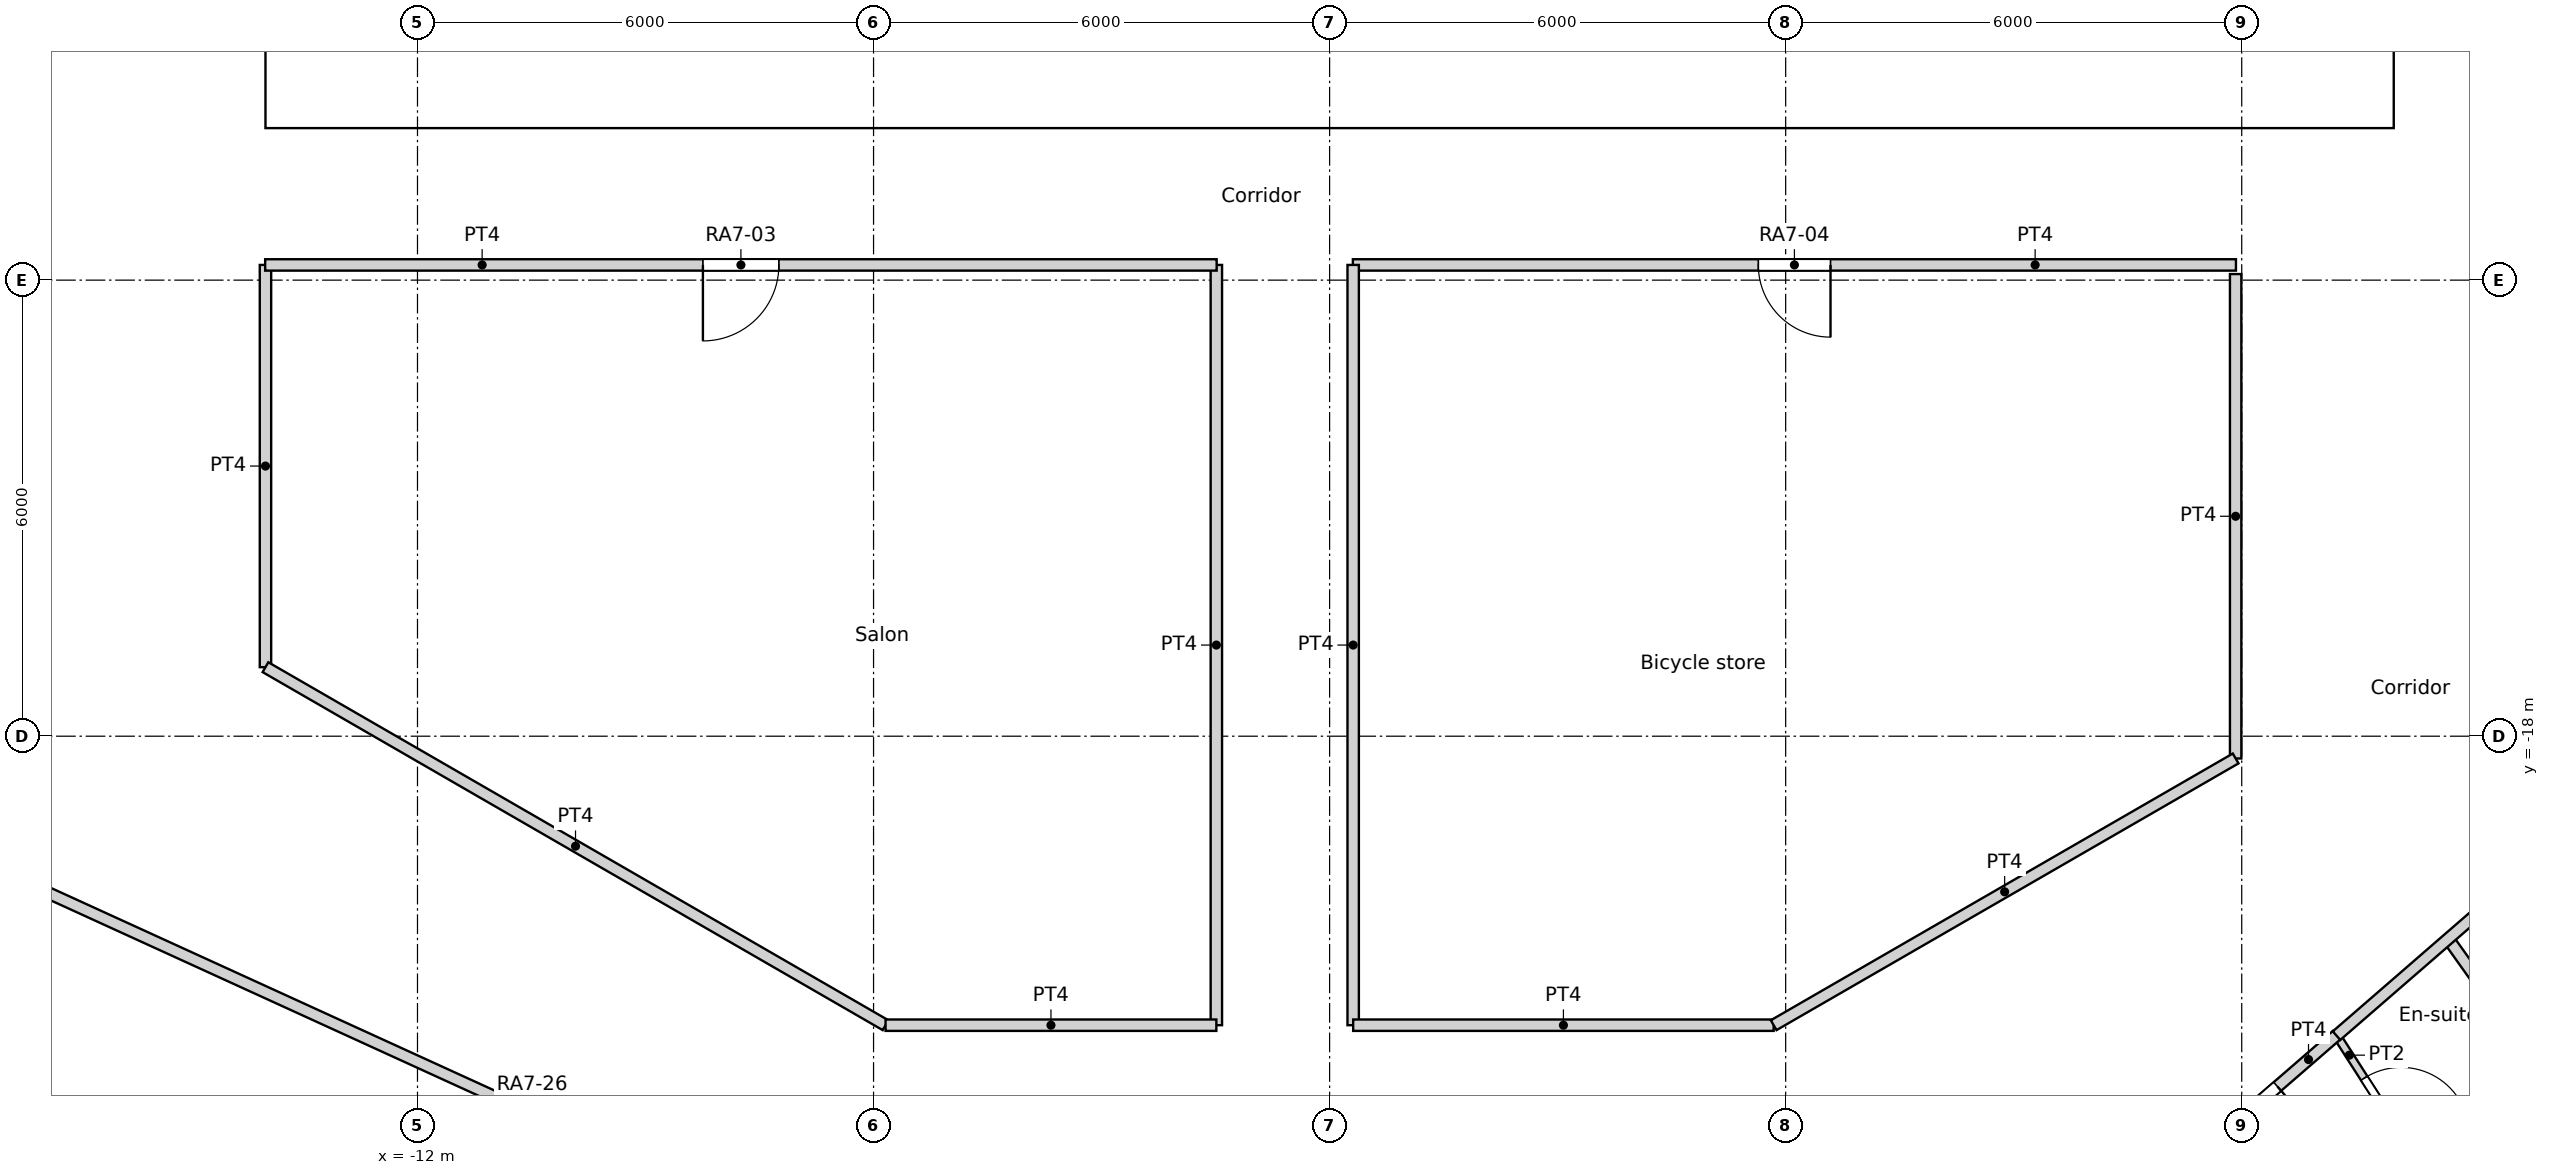
"""IFC4 building model, lengths in metres.
Left out: names, types, materials, properties, quantities, classifications, styles, units other than length and angle.
Written with IfcOpenShell. Run it as: python <this file> out.ifc"""

import sys

from ifc_helpers import new_model, si_unit, direction, frame, frame_2d, origin, origin_2d, place, context, subcontext, project, spatial, rectangle, circle, extrude, element, fill, save


model = new_model("IFC4")
c1 = context("Model", 3, precision=1e-05, world=origin(), true_north=direction((0.0, 1.0)))
c2 = subcontext(c1, "Body", "Model", "MODEL_VIEW")
j1 = project(units=[si_unit("LENGTHUNIT", "METRE"), si_unit("PLANEANGLEUNIT", "RADIAN")], contexts=[c1])
p1 = place(None, origin())
s1 = spatial("IfcSite", under=j1, at=p1, CompositionType="ELEMENT")
p2 = place(p1, origin())
s2 = spatial("IfcBuilding", under=s1, at=p2, CompositionType="ELEMENT")
p3 = place(p2, frame((0.0, 0.0, 93.0)))
s3 = spatial("IfcBuildingStorey", under=s2, at=p3, CompositionType="ELEMENT", Elevation=93.0)
for number, where, z_axis, x_axis in (
    (1, (-16.846, -17.855, 0.0), (0.0, 0.0, 1.0), (1.0, 0.0, 0.0)),
    (2, (-12.274, -21.259, 0.0), (0.0, 0.0, 1.0), (1.0, 0.0, 0.0)),
    (3, (9.723, -22.54, 0.0), (0.0, 0.0, 1.0), (1.0, 0.0, 0.0)),
    (4, (14.659, -19.69, 0.0), (0.0, 0.0, 1.0), (1.0, 0.0, 0.0)),
):
    element("IfcColumn", number, at=place(p3, frame(where, z_axis=z_axis, x_axis=x_axis)), inside=s3, PredefinedType="COLUMN", context=c2, shape_type="SweptSolid", body=[
        extrude(circle(Radius=0.65, at=origin_2d()), origin(), (0.0, 0.0, 1.0), 3.6),
    ])
for number, where, z_axis, x_axis in (
    (5, (-13.798, -12.802, 0.0), (0.0, 0.0, 1.0), (1.0, 0.0, 0.0)),
    (6, (-9.411, -16.301, 0.0), (0.0, 0.0, 1.0), (1.0, 0.0, 0.0)),
    (7, (-4.188, -18.35, 0.0), (0.0, 0.0, 1.0), (1.0, 0.0, 0.0)),
    (8, (1.406, -18.77, 0.0), (0.0, 0.0, 1.0), (1.0, 0.0, 0.0)),
    (9, (6.876, -17.521, 0.0), (0.0, 0.0, 1.0), (1.0, 0.0, 0.0)),
    (10, (11.735, -14.716, 0.0), (0.0, 0.0, 1.0), (1.0, 0.0, 0.0)),
    (11, (15.552, -10.603, 0.0), (0.0, 0.0, 1.0), (1.0, 0.0, 0.0)),
):
    element("IfcColumn", number, at=place(p3, frame(where, z_axis=z_axis, x_axis=x_axis)), inside=s3, PredefinedType="COLUMN", context=c2, shape_type="SweptSolid", body=[
        extrude(circle(Radius=0.7, at=origin_2d()), origin(), (0.0, 0.0, 1.0), 3.6),
    ])
p4 = place(p3, frame((-14.0, -9.4, 0.0), z_axis=(0.0, 0.0, 1.0), x_axis=(1.0, 0.0, 0.0)))
e12 = element("IfcWall", 12, at=p4, inside=s3, PredefinedType="SOLIDWALL", context=c2, shape_type="SweptSolid", body=[
    extrude(rectangle(XDim=28.0, YDim=1.2, at=frame_2d((14.0, 0.0))), origin(), (0.0, 0.0, 1.0), 3.6),
])
p5 = place(p4, frame((14.9, 0.0, 0.0)))
e13 = element("IfcOpeningElement", 13, at=p5, cuts=e12, PredefinedType="OPENING", context=c2, shape_type="SweptSolid", body=[
    extrude(rectangle(XDim=1.0, YDim=2.1, at=frame_2d((0.5, 1.05))), frame((0.0, 0.6, 0.0), z_axis=(0.0, -1.0, 0.0), x_axis=(1.0, 0.0, 0.0)), (0.0, 0.0, 1.0), 1.2),
])
p6 = place(p4, frame((9.8, 0.0, 0.0)))
e14 = element("IfcOpeningElement", 14, at=p6, cuts=e12, PredefinedType="OPENING", context=c2, shape_type="SweptSolid", body=[
    extrude(rectangle(XDim=1.8, YDim=2.1, at=frame_2d((0.9, 1.05))), frame((0.0, 0.6, 0.0), z_axis=(0.0, -1.0, 0.0), x_axis=(1.0, 0.0, 0.0)), (0.0, 0.0, 1.0), 1.2),
])
p7 = place(p4, frame((16.4, 0.0, 0.0)))
e15 = element("IfcOpeningElement", 15, at=p7, cuts=e12, PredefinedType="OPENING", context=c2, shape_type="SweptSolid", body=[
    extrude(rectangle(XDim=1.8, YDim=2.1, at=frame_2d((0.9, 1.05))), frame((0.0, 0.6, 0.0), z_axis=(0.0, -1.0, 0.0), x_axis=(1.0, 0.0, 0.0)), (0.0, 0.0, 1.0), 1.2),
])
p8 = place(p3, frame((-14.004, -11.8, 0.0), z_axis=(0.0, 0.0, 1.0), x_axis=(1.0, 0.0, 0.0)))
e16 = element("IfcWall", 16, at=p8, inside=s3, PredefinedType="PARTITIONING", context=c2, shape_type="SweptSolid", body=[
    extrude(rectangle(XDim=12.518, YDim=0.15, at=frame_2d((6.259, 0.0))), origin(), (0.0, 0.0, 1.0), 3.15),
])
p9 = place(p8, frame((5.759, 0.0, 0.0)))
e17 = element("IfcOpeningElement", 17, at=p9, cuts=e16, PredefinedType="OPENING", context=c2, shape_type="SweptSolid", body=[
    extrude(rectangle(XDim=1.0, YDim=2.04, at=frame_2d((0.5, 1.02))), frame((0.0, 0.075, 0.0), z_axis=(0.0, -1.0, 0.0), x_axis=(1.0, 0.0, 0.0)), (0.0, 0.0, 1.0), 0.15),
])
p10 = place(p3, frame((0.306, -11.8, 0.0), z_axis=(0.0, 0.0, 1.0), x_axis=(1.0, 0.0, 0.0)))
e18 = element("IfcWall", 18, at=p10, inside=s3, PredefinedType="PARTITIONING", context=c2, shape_type="SweptSolid", body=[
    extrude(rectangle(XDim=11.618, YDim=0.15, at=frame_2d((5.809, 0.0))), origin(), (0.0, 0.0, 1.0), 3.15),
])
p11 = place(p10, frame((5.334, 0.0, 0.0)))
e19 = element("IfcOpeningElement", 19, at=p11, cuts=e18, PredefinedType="OPENING", context=c2, shape_type="SweptSolid", body=[
    extrude(rectangle(XDim=0.95, YDim=2.1, at=frame_2d((0.475, 1.05))), frame((0.0, 0.075, 0.0), z_axis=(0.0, -1.0, 0.0), x_axis=(1.0, 0.0, 0.0)), (0.0, 0.0, 1.0), 0.15),
])
p12 = place(p3, frame((13.247, -21.939, 0.0), z_axis=(0.0, 0.0, 1.0), x_axis=(0.755420750547, 0.655240024451, 0.0)))
e20 = element("IfcWall", 20, at=p12, inside=s3, PredefinedType="PARTITIONING", context=c2, shape_type="SweptSolid", body=[
    extrude(rectangle(XDim=11.771, YDim=0.15, at=frame_2d((5.885, 0.0))), origin(), (0.0, 0.0, 1.0), 3.15),
])
p13 = place(p12, frame((4.513, 0.0, 0.0)))
e21 = element("IfcOpeningElement", 21, at=p13, cuts=e20, PredefinedType="OPENING", context=c2, shape_type="SweptSolid", body=[
    extrude(rectangle(XDim=1.0, YDim=2.1, at=frame_2d((0.5, 1.05))), frame((0.0, 0.075, 0.0), z_axis=(0.0, -1.0, 0.0), x_axis=(1.0, 0.0, 0.0)), (0.0, 0.0, 1.0), 0.15),
])
p14 = place(p3, frame((-14.0, -17.092, 0.0), z_axis=(0.0, 0.0, 1.0), x_axis=(0.0, 1.0, 0.0)))
e22 = element("IfcWall", 22, at=p14, inside=s3, PredefinedType="PARTITIONING", context=c2, shape_type="SweptSolid", body=[
    extrude(rectangle(XDim=5.292, YDim=0.15, at=frame_2d((2.646, 0.0))), origin(), (0.0, 0.0, 1.0), 3.15),
])
p15 = place(p3, frame((-14.0, -17.092, 0.0), z_axis=(0.0, 0.0, 1.0), x_axis=(0.86602719091, -0.499996904595, 0.0)))
e23 = element("IfcWall", 23, at=p15, inside=s3, PredefinedType="PARTITIONING", context=c2, shape_type="SweptSolid", body=[
    extrude(rectangle(XDim=9.42, YDim=0.15, at=frame_2d((4.71, 0.0))), origin(), (0.0, 0.0, 1.0), 3.15),
])
p16 = place(p3, frame((-5.842, -21.802, 0.0), z_axis=(0.0, 0.0, 1.0), x_axis=(1.0, 0.0, 0.0)))
e24 = element("IfcWall", 24, at=p16, inside=s3, PredefinedType="PARTITIONING", context=c2, shape_type="SweptSolid", body=[
    extrude(rectangle(XDim=4.352, YDim=0.15, at=frame_2d((2.176, 0.0))), origin(), (0.0, 0.0, 1.0), 3.15),
])
for number, where, z_axis, x_axis in (
    (25, (-1.49, -21.802, 0.0), (0.0, 0.0, 1.0), (0.0, 1.0, 0.0)),
    (26, (0.31, -21.802, 0.0), (0.0, 0.0, 1.0), (0.0, 1.0, 0.0)),
):
    element("IfcWall", number, at=place(p3, frame(where, z_axis=z_axis, x_axis=x_axis)), inside=s3, PredefinedType="PARTITIONING", context=c2, shape_type="SweptSolid", body=[
        extrude(rectangle(XDim=10.002, YDim=0.15, at=frame_2d((5.001, 0.0))), origin(), (0.0, 0.0, 1.0), 3.15),
    ])
p17 = place(p3, frame((0.31, -21.802, 0.0), z_axis=(0.0, 0.0, 1.0), x_axis=(1.0, 0.0, 0.0)))
e27 = element("IfcWall", 27, at=p17, inside=s3, PredefinedType="PARTITIONING", context=c2, shape_type="SweptSolid", body=[
    extrude(rectangle(XDim=5.532, YDim=0.15, at=frame_2d((2.766, 0.0))), origin(), (0.0, 0.0, 1.0), 3.15),
])
p18 = place(p3, frame((5.842, -21.802, 0.0), z_axis=(0.0, 0.0, 1.0), x_axis=(0.866027436592, 0.499996479058, 0.0)))
e28 = element("IfcWall", 28, at=p18, inside=s3, PredefinedType="PARTITIONING", context=c2, shape_type="SweptSolid", body=[
    extrude(rectangle(XDim=7.018, YDim=0.15, at=frame_2d((3.509, 0.0))), origin(), (0.0, 0.0, 1.0), 3.15),
])
p19 = place(p3, frame((11.92, -18.293, 0.0), z_axis=(0.0, 0.0, 1.0), x_axis=(0.0, 1.0, 0.0)))
e29 = element("IfcWall", 29, at=p19, inside=s3, PredefinedType="PARTITIONING", context=c2, shape_type="SweptSolid", body=[
    extrude(rectangle(XDim=6.373, YDim=0.15, at=frame_2d((3.187, 0.0))), origin(), (0.0, 0.0, 1.0), 3.15),
])
p20 = place(p3, frame((-17.235, -19.89, 0.0), z_axis=(0.0, 0.0, 1.0), x_axis=(0.90960889055, -0.415465601743, 0.0)))
e30 = element("IfcWall", 30, at=p20, inside=s3, PredefinedType="PARTITIONING", context=c2, shape_type="SweptSolid", body=[
    extrude(rectangle(XDim=14.829, YDim=0.15, at=frame_2d((7.415, 0.0))), origin(), (0.0, 0.0, 1.0), 3.15),
])
p21 = place(p20, frame((6.939, 0.0, 0.0)))
e31 = element("IfcOpeningElement", 31, at=p21, cuts=e30, PredefinedType="OPENING", context=c2, shape_type="SweptSolid", body=[
    extrude(rectangle(XDim=0.95, YDim=2.1, at=frame_2d((0.475, 1.05))), frame((0.0, 0.075, 0.0), z_axis=(0.0, -1.0, 0.0), x_axis=(1.0, 0.0, 0.0)), (0.0, 0.0, 1.0), 0.15),
])
p22 = place(p3, frame((10.933, -23.94, 0.0), z_axis=(0.0, 0.0, 1.0), x_axis=(0.755675945931, 0.654945696025, 0.0)))
e32 = element("IfcWall", 32, at=p22, inside=s3, PredefinedType="PARTITIONING", context=c2, shape_type="SweptSolid", body=[
    extrude(rectangle(XDim=3.066, YDim=0.15, at=frame_2d((1.533, 0.0))), origin(), (0.0, 0.0, 1.0), 3.15),
])
p23 = place(p22, frame((1.033, 0.0, 0.0)))
e33 = element("IfcOpeningElement", 33, at=p23, cuts=e32, PredefinedType="OPENING", context=c2, shape_type="SweptSolid", body=[
    extrude(rectangle(XDim=1.0, YDim=2.1, at=frame_2d((0.5, 1.05))), frame((0.0, 0.075, 0.0), z_axis=(0.0, -1.0, 0.0), x_axis=(1.0, 0.0, 0.0)), (0.0, 0.0, 1.0), 0.15),
])
p24 = place(p3, frame((13.248, -21.935, 0.0), z_axis=(0.0, 0.0, 1.0), x_axis=(0.540597960994, -0.841281073464, 0.0)))
e34 = element("IfcWall", 34, at=p24, inside=s3, PredefinedType="PARTITIONING", context=c2, shape_type="SweptSolid", body=[
    extrude(rectangle(XDim=2.242, YDim=0.1, at=frame_2d((1.121, 0.0))), origin(), (0.0, 0.0, 1.0), 3.15),
])
p25 = place(p24, frame((0.671, 0.0, 0.0)))
e35 = element("IfcOpeningElement", 35, at=p25, cuts=e34, PredefinedType="OPENING", context=c2, shape_type="SweptSolid", body=[
    extrude(rectangle(XDim=0.9, YDim=2.04, at=frame_2d((0.45, 1.02))), frame((0.0, 0.05, 0.0), z_axis=(0.0, -1.0, 0.0), x_axis=(1.0, 0.0, 0.0)), (0.0, 0.0, 1.0), 0.1),
])
p26 = place(p3, frame((14.46, -23.821, 0.0), z_axis=(0.0, 0.0, 1.0), x_axis=(0.841135728185, 0.540824081168, 0.0)))
e36 = element("IfcWall", 36, at=p26, inside=s3, PredefinedType="PARTITIONING", context=c2, shape_type="SweptSolid", body=[
    extrude(rectangle(XDim=2.041, YDim=0.1, at=frame_2d((1.021, 0.0))), origin(), (0.0, 0.0, 1.0), 3.15),
])
p27 = place(p3, frame((14.715, -20.664, 0.0), z_axis=(0.0, 0.0, 1.0), x_axis=(0.57995989616, -0.814645026282, 0.0)))
e37 = element("IfcWall", 37, at=p27, inside=s3, PredefinedType="PARTITIONING", context=c2, shape_type="SweptSolid", body=[
    extrude(rectangle(XDim=5.857, YDim=0.15, at=frame_2d((2.928, 0.0))), origin(), (0.0, 0.0, 1.0), 3.15),
])
p28 = place(p5, origin())
e38 = element("IfcDoor", 38, at=p28, inside=s3, OperationType="SINGLE_SWING_LEFT", PredefinedType="DOOR", context=c2, shape_type="SweptSolid", body=[
    extrude(rectangle(XDim=1.0, YDim=2.1, at=frame_2d((0.5, 1.05))), frame((0.0, 0.025, 0.0), z_axis=(0.0, -1.0, 0.0), x_axis=(1.0, 0.0, 0.0)), (0.0, 0.0, 1.0), 0.05),
])
fill(e13, e38)
p29 = place(p6, origin())
e39 = element("IfcDoor", 39, at=p29, inside=s3, OperationType="DOUBLE_DOOR_SINGLE_SWING", PredefinedType="DOOR", context=c2, shape_type="SweptSolid", body=[
    extrude(rectangle(XDim=1.8, YDim=2.1, at=frame_2d((0.9, 1.05))), frame((0.0, 0.025, 0.0), z_axis=(0.0, -1.0, 0.0), x_axis=(1.0, 0.0, 0.0)), (0.0, 0.0, 1.0), 0.05),
])
fill(e14, e39)
p30 = place(p7, origin())
e40 = element("IfcDoor", 40, at=p30, inside=s3, OperationType="DOUBLE_DOOR_SINGLE_SWING", PredefinedType="DOOR", context=c2, shape_type="SweptSolid", body=[
    extrude(rectangle(XDim=1.8, YDim=2.1, at=frame_2d((0.9, 1.05))), frame((0.0, 0.025, 0.0), z_axis=(0.0, -1.0, 0.0), x_axis=(1.0, 0.0, 0.0)), (0.0, 0.0, 1.0), 0.05),
])
fill(e15, e40)
p31 = place(p9, origin())
e41 = element("IfcDoor", 41, at=p31, inside=s3, OperationType="SINGLE_SWING_RIGHT", PredefinedType="DOOR", context=c2, shape_type="SweptSolid", body=[
    extrude(rectangle(XDim=1.0, YDim=2.04, at=frame_2d((0.5, 1.02))), frame((0.0, 0.025, 0.0), z_axis=(0.0, -1.0, 0.0), x_axis=(1.0, 0.0, 0.0)), (0.0, 0.0, 1.0), 0.05),
])
fill(e17, e41)
p32 = place(p11, origin())
e42 = element("IfcDoor", 42, at=p32, inside=s3, OperationType="SINGLE_SWING_LEFT", PredefinedType="DOOR", context=c2, shape_type="SweptSolid", body=[
    extrude(rectangle(XDim=0.95, YDim=2.1, at=frame_2d((0.475, 1.05))), frame((0.0, 0.025, 0.0), z_axis=(0.0, -1.0, 0.0), x_axis=(1.0, 0.0, 0.0)), (0.0, 0.0, 1.0), 0.05),
])
fill(e19, e42)
p33 = place(p25, origin())
e43 = element("IfcDoor", 43, at=p33, inside=s3, OperationType="SINGLE_SWING_RIGHT", PredefinedType="DOOR", context=c2, shape_type="SweptSolid", body=[
    extrude(rectangle(XDim=0.9, YDim=2.04, at=frame_2d((0.45, 1.02))), frame((0.0, 0.025, 0.0), z_axis=(0.0, -1.0, 0.0), x_axis=(1.0, 0.0, 0.0)), (0.0, 0.0, 1.0), 0.05),
])
fill(e35, e43)
p34 = place(p23, origin())
e44 = element("IfcDoor", 44, at=p34, inside=s3, OperationType="SINGLE_SWING_LEFT", PredefinedType="DOOR", context=c2, shape_type="SweptSolid", body=[
    extrude(rectangle(XDim=1.0, YDim=2.1, at=frame_2d((0.5, 1.05))), frame((0.0, 0.025, 0.0), z_axis=(0.0, -1.0, 0.0), x_axis=(1.0, 0.0, 0.0)), (0.0, 0.0, 1.0), 0.05),
])
fill(e33, e44)
save(model, sys.argv[1])
